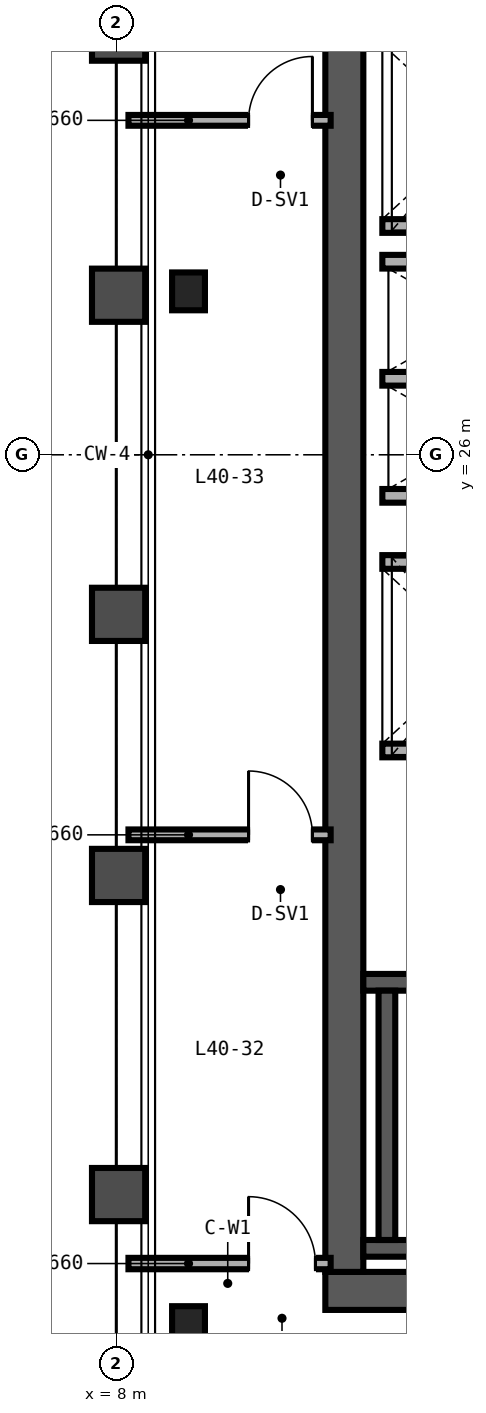
"""IFC4 building model, lengths in metres.
Left out: names, types, materials, properties, quantities, classifications, styles, units other than length and angle.
Written with IfcOpenShell. Run it as: python <this file> out.ifc"""

import sys

from ifc_helpers import new_model, si_unit, direction, frame, frame_2d, origin, origin_2d, place, context, subcontext, project, spatial, rectangle, i_section, extrude, source, transform, mapped, element, fill, save


model = new_model("IFC4")
c1 = context("Model", 3, precision=1e-05, world=origin(), true_north=direction((0.0, 1.0)))
c2 = subcontext(c1, "Body", "Model", "MODEL_VIEW")
j1 = project(units=[si_unit("LENGTHUNIT", "METRE"), si_unit("PLANEANGLEUNIT", "RADIAN")], contexts=[c1])
p1 = place(None, origin())
s1 = spatial("IfcSite", under=j1, at=p1, CompositionType="ELEMENT")
p2 = place(p1, origin())
s2 = spatial("IfcBuilding", under=s1, at=p2, CompositionType="ELEMENT")
p3 = place(p2, frame((0.0, 0.0, 163.2)))
s3 = spatial("IfcBuildingStorey", under=s2, at=p3, CompositionType="ELEMENT", Elevation=163.2)
p4 = place(p3, frame((10.75, 15.0, 0.0), z_axis=(0.0, 0.0, 1.0), x_axis=(1.0, 0.0, 0.0)))
e1 = element("IfcWall", 1, at=p4, inside=s3, PredefinedType="SHEAR", context=c2, shape_type="SweptSolid", body=[
    extrude(rectangle(XDim=12.5, YDim=0.5, at=frame_2d((6.25, 0.0))), origin(), (0.0, 0.0, 1.0), 3.37),
])
p5 = place(p4, frame((10.15, 0.0, 0.0)))
e2 = element("IfcOpeningElement", 2, at=p5, cuts=e1, PredefinedType="OPENING", context=c2, shape_type="SweptSolid", body=[
    extrude(rectangle(XDim=1.0, YDim=2.15, at=frame_2d((0.5, 1.075))), frame((0.0, 0.26, 0.0), z_axis=(0.0, -1.0, 0.0), x_axis=(1.0, 0.0, 0.0)), (0.0, 0.0, 1.0), 0.52),
])
p6 = place(p3, frame((11.0, 15.25, 0.0), z_axis=(0.0, 0.0, 1.0), x_axis=(0.0, 1.0, 0.0)))
e3 = element("IfcWall", 3, at=p6, inside=s3, PredefinedType="SHEAR", context=c2, shape_type="SweptSolid", body=[
    extrude(rectangle(XDim=21.5, YDim=0.5, at=frame_2d((10.75, 0.0))), origin(), (0.0, 0.0, 1.0), 3.37),
])
p7 = place(p3, frame((11.25, 15.56, 0.0), z_axis=(0.0, 0.0, 1.0), x_axis=(1.0, 0.0, 0.0)))
e4 = element("IfcWall", 4, at=p7, inside=s3, PredefinedType="SHEAR", context=c2, shape_type="SweptSolid", body=[
    extrude(rectangle(XDim=8.06, YDim=0.22, at=frame_2d((4.03, 0.0))), origin(), (0.0, 0.0, 1.0), 3.4),
])
p8 = place(p3, frame((11.25, 19.06, 0.0), z_axis=(0.0, 0.0, 1.0), x_axis=(1.0, 0.0, 0.0)))
e5 = element("IfcWall", 5, at=p8, inside=s3, PredefinedType="SHEAR", context=c2, shape_type="SweptSolid", body=[
    extrude(rectangle(XDim=8.06, YDim=0.22, at=frame_2d((4.03, 0.0))), origin(), (0.0, 0.0, 1.0), 3.4),
])
p9 = place(p8, frame((0.67, 0.0, 0.0)))
e6 = element("IfcOpeningElement", 6, at=p9, cuts=e5, PredefinedType="OPENING", context=c2, shape_type="SweptSolid", body=[
    extrude(rectangle(XDim=1.05, YDim=2.15, at=frame_2d((0.525, 1.075))), frame((0.0, 0.12, 0.0), z_axis=(0.0, -1.0, 0.0), x_axis=(1.0, 0.0, 0.0)), (0.0, 0.0, 1.0), 0.24),
])
p10 = place(p3, frame((11.56, 15.67, 0.0), z_axis=(0.0, 0.0, 1.0), x_axis=(0.0, 1.0, 0.0)))
e7 = element("IfcWall", 7, at=p10, inside=s3, PredefinedType="SHEAR", context=c2, shape_type="SweptSolid", body=[
    extrude(rectangle(XDim=3.28, YDim=0.22, at=frame_2d((1.64, 0.0))), origin(), (0.0, 0.0, 1.0), 3.4),
])
m1 = source(origin(), c2, "Body", "SweptSolid", [
    extrude(i_section(OverallWidth=0.432, OverallDepth=0.498, WebThickness=0.056, FlangeThickness=0.089, FilletRadius=0.025, at=origin_2d()), origin(), (0.0, 0.0, 1.0), 3.37),
])
for number, where, z_axis, x_axis in (
    (8, (8.95, 14.55, 0.0), (0.0, 0.0, 1.0), (1.0, 0.0, 0.0)),
    (9, (8.95, 28.15, 0.0), (0.0, 0.0, 1.0), (1.0, 0.0, 0.0)),
):
    element("IfcColumn", number, at=place(p3, frame(where, z_axis=z_axis, x_axis=x_axis)), inside=s3, PredefinedType="COLUMN", context=c2, shape_type="MappedRepresentation", body=[
        mapped(m1, transform((0.0, 0.0, 0.0), scale=1.0)),
    ])
for number, where, z_axis, x_axis in (
    (10, (11.5, 22.11, 0.0), (0.0, 0.0, 1.0), (1.0, 0.0, 0.0)),
    (11, (11.5, 24.59, 0.0), (0.0, 0.0, 1.0), (1.0, 0.0, 0.0)),
    (12, (11.5, 29.01, 0.0), (0.0, 0.0, 1.0), (1.0, 0.0, 0.0)),
):
    element("IfcWall", number, at=place(p3, frame(where, z_axis=z_axis, x_axis=x_axis)), inside=s3, PredefinedType="SOLIDWALL", context=c2, shape_type="SweptSolid", body=[
        extrude(rectangle(XDim=2.5, YDim=0.18, at=frame_2d((1.25, 0.0))), origin(), (0.0, 0.0, 1.0), 3.37),
    ])
for number, where, z_axis, x_axis in (
    (13, (11.5, 25.46, 0.0), (0.0, 0.0, 1.0), (1.0, 0.0, 0.0)),
    (14, (11.5, 27.0, 0.0), (0.0, 0.0, 1.0), (1.0, 0.0, 0.0)),
    (15, (11.5, 28.54, 0.0), (0.0, 0.0, 1.0), (1.0, 0.0, 0.0)),
):
    element("IfcWall", number, at=place(p3, frame(where, z_axis=z_axis, x_axis=x_axis)), inside=s3, PredefinedType="SOLIDWALL", context=c2, shape_type="SweptSolid", body=[
        extrude(rectangle(XDim=2.51, YDim=0.18, at=frame_2d((1.255, 0.0))), origin(), (0.0, 0.0, 1.0), 3.37),
    ])
p11 = place(p3, frame((8.16, 15.36, 0.0), z_axis=(0.0, 0.0, 1.0), x_axis=(1.0, 0.0, 0.0)))
e16 = element("IfcWall", 16, at=p11, inside=s3, PredefinedType="PARTITIONING", context=c2, shape_type="SweptSolid", body=[
    extrude(rectangle(XDim=2.66, YDim=0.15, at=frame_2d((1.33, 0.0))), origin(), (0.0, 0.0, 1.0), 2.591),
])
p12 = place(p11, frame((1.58, 0.0, 0.0)))
e17 = element("IfcOpeningElement", 17, at=p12, cuts=e16, PredefinedType="OPENING", context=c2, shape_type="SweptSolid", body=[
    extrude(rectangle(XDim=0.88, YDim=2.15, at=frame_2d((0.44, 1.075))), frame((0.0, 0.085, 0.0), z_axis=(0.0, -1.0, 0.0), x_axis=(1.0, 0.0, 0.0)), (0.0, 0.0, 1.0), 0.17),
])
p13 = place(p3, frame((8.16, 21.0, 0.0), z_axis=(0.0, 0.0, 1.0), x_axis=(1.0, 0.0, 0.0)))
e18 = element("IfcWall", 18, at=p13, inside=s3, PredefinedType="PARTITIONING", context=c2, shape_type="SweptSolid", body=[
    extrude(rectangle(XDim=2.66, YDim=0.142, at=frame_2d((1.33, 0.0))), origin(), (0.0, 0.0, 1.0), 2.47),
])
p14 = place(p13, frame((1.58, 0.0, 0.0)))
e19 = element("IfcOpeningElement", 19, at=p14, cuts=e18, PredefinedType="OPENING", context=c2, shape_type="SweptSolid", body=[
    extrude(rectangle(XDim=0.84, YDim=2.1, at=frame_2d((0.42, 1.05))), frame((0.0, 0.081, 0.0), z_axis=(0.0, -1.0, 0.0), x_axis=(1.0, 0.0, 0.0)), (0.0, 0.0, 1.0), 0.162),
])
p15 = place(p3, frame((8.16, 30.4, 0.0), z_axis=(0.0, 0.0, 1.0), x_axis=(1.0, 0.0, 0.0)))
e20 = element("IfcWall", 20, at=p15, inside=s3, PredefinedType="PARTITIONING", context=c2, shape_type="SweptSolid", body=[
    extrude(rectangle(XDim=2.66, YDim=0.142, at=frame_2d((1.33, 0.0))), origin(), (0.0, 0.0, 1.0), 2.753),
])
p16 = place(p15, frame((1.58, 0.0, 0.0)))
e21 = element("IfcOpeningElement", 21, at=p16, cuts=e20, PredefinedType="OPENING", context=c2, shape_type="SweptSolid", body=[
    extrude(rectangle(XDim=0.84, YDim=2.1, at=frame_2d((0.42, 1.05))), frame((0.0, 0.081, 0.0), z_axis=(0.0, -1.0, 0.0), x_axis=(1.0, 0.0, 0.0)), (0.0, 0.0, 1.0), 0.162),
])
m2 = source(origin(), c2, "Body", "SweptSolid", [
    extrude(rectangle(XDim=0.88, YDim=2.15, at=frame_2d((0.44, 1.075))), frame((0.0, 0.025, 0.0), z_axis=(0.0, -1.0, 0.0), x_axis=(1.0, 0.0, 0.0)), (0.0, 0.0, 1.0), 0.05),
])
p17 = place(p12, origin())
e22 = element("IfcDoor", 22, at=p17, inside=s3, OperationType="SINGLE_SWING_LEFT", PredefinedType="DOOR", context=c2, shape_type="MappedRepresentation", body=[
    mapped(m2, transform((0.0, 0.0, 0.0), scale=1.0)),
])
fill(e17, e22)
m3 = source(origin(), c2, "Body", "SweptSolid", [
    extrude(rectangle(XDim=0.84, YDim=2.1, at=frame_2d((0.42, 1.05))), frame((0.0, 0.025, 0.0), z_axis=(0.0, -1.0, 0.0), x_axis=(1.0, 0.0, 0.0)), (0.0, 0.0, 1.0), 0.05),
])
p18 = place(p14, origin())
e23 = element("IfcDoor", 23, at=p18, inside=s3, OperationType="SINGLE_SWING_LEFT", PredefinedType="DOOR", context=c2, shape_type="MappedRepresentation", body=[
    mapped(m3, transform((0.0, 0.0, 0.0), scale=1.0)),
])
fill(e19, e23)
p19 = place(p16, origin())
e24 = element("IfcDoor", 24, at=p19, inside=s3, OperationType="SINGLE_SWING_RIGHT", PredefinedType="DOOR", context=c2, shape_type="MappedRepresentation", body=[
    mapped(m3, transform((0.0, 0.0, 0.0), scale=1.0)),
])
fill(e21, e24)
save(model, sys.argv[1])
